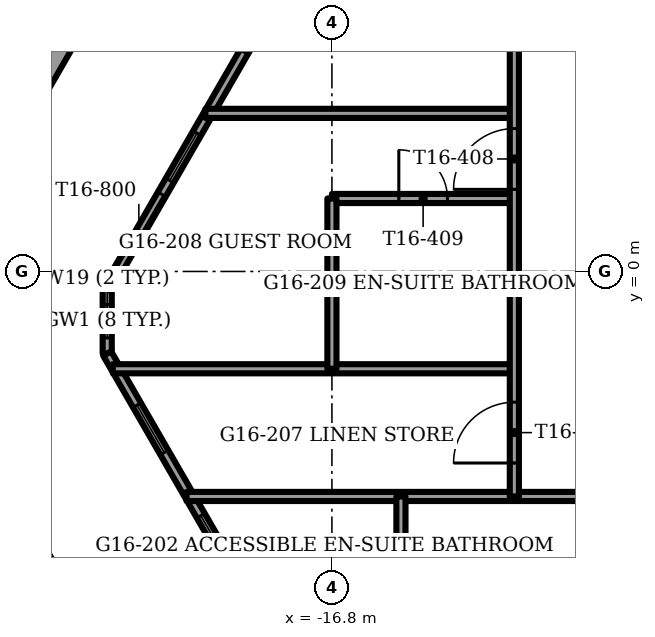
"""IFC4 building model, lengths in metres.
Left out: names, types, materials, properties, quantities, classifications, styles, units other than length and angle.
Written with IfcOpenShell. Run it as: python <this file> out.ifc"""

import sys

from ifc_helpers import new_model, si_unit, direction, frame, frame_2d, origin, place, context, subcontext, project, spatial, rectangle, extrude, element, fill, save


model = new_model("IFC4")
c1 = context("Model", 3, precision=1e-05, world=origin(), true_north=direction((0.0, 1.0)))
c2 = subcontext(c1, "Body", "Model", "MODEL_VIEW")
j1 = project(units=[si_unit("LENGTHUNIT", "METRE"), si_unit("PLANEANGLEUNIT", "RADIAN")], contexts=[c1])
p1 = place(None, origin())
s1 = spatial("IfcSite", under=j1, at=p1, CompositionType="ELEMENT")
p2 = place(p1, origin())
s2 = spatial("IfcBuilding", under=s1, at=p2, CompositionType="ELEMENT")
p3 = place(p2, frame((0.0, 0.0, 65.5)))
s3 = spatial("IfcBuildingStorey", under=s2, at=p3, CompositionType="ELEMENT", Elevation=65.5)
p4 = place(p3, frame((-20.214, 6.052, 0.0), z_axis=(0.0, 0.0, 1.0), x_axis=(-0.500014005679, -0.866017317451, 0.0)))
e1 = element("IfcWall", 1, at=p4, inside=s3, PredefinedType="PARAPET", context=c2, shape_type="SweptSolid", body=[
    extrude(rectangle(XDim=7.176, YDim=0.9, at=frame_2d((3.588, 0.0))), origin(), (0.0, 0.0, 1.0), 1.1),
])
p5 = place(p3, frame((-23.802, -1.474, 0.0), z_axis=(0.0, 0.0, 1.0), x_axis=(0.499996461177, -0.866027446915, 0.0)))
e2 = element("IfcWall", 2, at=p5, inside=s3, PredefinedType="PARAPET", context=c2, shape_type="SweptSolid", body=[
    extrude(rectangle(XDim=5.759, YDim=0.9, at=frame_2d((2.879, 0.0))), origin(), (0.0, 0.0, 1.0), 1.1),
])
p6 = place(p3, frame((-14.679, 9.789, 0.0), z_axis=(0.0, 0.0, 1.0), x_axis=(-0.500001004067, -0.866024824085, 0.0)))
e3 = element("IfcWall", 3, at=p6, inside=s3, PredefinedType="SOLIDWALL", context=c2, shape_type="SweptSolid", body=[
    extrude(rectangle(XDim=11.633, YDim=0.15, at=frame_2d((5.817, 0.0))), origin(), (0.0, 0.0, 1.0), 3.45),
])
p7 = place(p6, frame((3.538, 0.0, 0.15)))
e4 = element("IfcOpeningElement", 4, at=p7, cuts=e3, PredefinedType="OPENING", context=c2, shape_type="SweptSolid", body=[
    extrude(rectangle(XDim=1.8, YDim=2.2, at=frame_2d((0.9, 1.1))), frame((0.0, 0.075, 0.0), z_axis=(0.0, -1.0, 0.0), x_axis=(1.0, 0.0, 0.0)), (0.0, 0.0, 1.0), 0.15),
])
p8 = place(p6, frame((5.638, 0.0, 0.15)))
e5 = element("IfcOpeningElement", 5, at=p8, cuts=e3, PredefinedType="OPENING", context=c2, shape_type="SweptSolid", body=[
    extrude(rectangle(XDim=1.5, YDim=2.2, at=frame_2d((0.75, 1.1))), frame((0.0, 0.075, 0.0), z_axis=(0.0, -1.0, 0.0), x_axis=(1.0, 0.0, 0.0)), (0.0, 0.0, 1.0), 0.15),
])
p9 = place(p6, frame((8.677, 0.0, 0.15)))
e6 = element("IfcOpeningElement", 6, at=p9, cuts=e3, PredefinedType="OPENING", context=c2, shape_type="SweptSolid", body=[
    extrude(rectangle(XDim=0.9, YDim=2.2, at=frame_2d((0.45, 1.1))), frame((0.0, 0.075, 0.0), z_axis=(0.0, -1.0, 0.0), x_axis=(1.0, 0.0, 0.0)), (0.0, 0.0, 1.0), 0.15),
])
p10 = place(p6, frame((9.838, 0.0, 0.0)))
e7 = element("IfcOpeningElement", 7, at=p10, cuts=e3, PredefinedType="OPENING", context=c2, shape_type="SweptSolid", body=[
    extrude(rectangle(XDim=1.5, YDim=2.4, at=frame_2d((0.75, 1.2))), frame((0.0, 0.075, 0.0), z_axis=(0.0, -1.0, 0.0), x_axis=(1.0, 0.0, 0.0)), (0.0, 0.0, 1.0), 0.15),
])
p11 = place(p3, frame((-20.496, -1.351, 0.0), z_axis=(0.0, 0.0, 1.0), x_axis=(0.500010091595, -0.866019577321, 0.0)))
e8 = element("IfcWall", 8, at=p11, inside=s3, PredefinedType="SOLIDWALL", context=c2, shape_type="SweptSolid", body=[
    extrude(rectangle(XDim=11.633, YDim=0.15, at=frame_2d((5.816, 0.0))), origin(), (0.0, 0.0, 1.0), 3.45),
])
p12 = place(p11, frame((0.978, 0.0, 0.15)))
e9 = element("IfcOpeningElement", 9, at=p12, cuts=e8, PredefinedType="OPENING", context=c2, shape_type="SweptSolid", body=[
    extrude(rectangle(XDim=0.9, YDim=2.2, at=frame_2d((0.45, 1.1))), frame((0.0, 0.075, 0.0), z_axis=(0.0, -1.0, 0.0), x_axis=(1.0, 0.0, 0.0)), (0.0, 0.0, 1.0), 0.15),
])
p13 = place(p11, frame((3.078, 0.0, 0.15)))
e10 = element("IfcOpeningElement", 10, at=p13, cuts=e8, PredefinedType="OPENING", context=c2, shape_type="SweptSolid", body=[
    extrude(rectangle(XDim=1.5, YDim=2.2, at=frame_2d((0.75, 1.1))), frame((0.0, 0.075, 0.0), z_axis=(0.0, -1.0, 0.0), x_axis=(1.0, 0.0, 0.0)), (0.0, 0.0, 1.0), 0.15),
])
p14 = place(p11, frame((6.501, 0.0, 0.15)))
e11 = element("IfcOpeningElement", 11, at=p14, cuts=e8, PredefinedType="OPENING", context=c2, shape_type="SweptSolid", body=[
    extrude(rectangle(XDim=1.8, YDim=2.2, at=frame_2d((0.9, 1.1))), frame((0.0, 0.075, 0.0), z_axis=(0.0, -1.0, 0.0), x_axis=(1.0, 0.0, 0.0)), (0.0, 0.0, 1.0), 0.15),
])
p15 = place(p3, frame((-20.496, -0.286, 0.0), z_axis=(0.0, 0.0, 1.0), x_axis=(0.0, -1.0, 0.0)))
e12 = element("IfcWall", 12, at=p15, inside=s3, PredefinedType="SOLIDWALL", context=c2, shape_type="SweptSolid", body=[
    extrude(rectangle(XDim=1.065, YDim=0.15, at=frame_2d((0.532, 0.0))), origin(), (0.0, 0.0, 1.0), 3.45),
])
p16 = place(p15, frame((0.258, 0.0, 0.15)))
e13 = element("IfcOpeningElement", 13, at=p16, cuts=e12, PredefinedType="OPENING", context=c2, shape_type="SweptSolid", body=[
    extrude(rectangle(XDim=0.55, YDim=2.2, at=frame_2d((0.275, 1.1))), frame((0.0, 0.075, 0.0), z_axis=(0.0, -1.0, 0.0), x_axis=(1.0, 0.0, 0.0)), (0.0, 0.0, 1.0), 0.15),
])
p17 = place(p3, frame((-19.191, -3.7, 0.0), z_axis=(0.0, 0.0, 1.0), x_axis=(1.0, 0.0, 0.0)))
e14 = element("IfcWall", 14, at=p17, inside=s3, PredefinedType="PARTITIONING", context=c2, shape_type="SweptSolid", body=[
    extrude(rectangle(XDim=10.031, YDim=0.15, at=frame_2d((5.016, 0.0))), origin(), (0.0, 0.0, 1.0), 3.45),
])
p18 = place(p17, frame((8.791, 0.0, 0.0)))
e15 = element("IfcOpeningElement", 15, at=p18, cuts=e14, PredefinedType="OPENING", context=c2, shape_type="SweptSolid", body=[
    extrude(rectangle(XDim=1.0, YDim=2.1, at=frame_2d((0.5, 1.05))), frame((0.0, 0.075, 0.0), z_axis=(0.0, -1.0, 0.0), x_axis=(1.0, 0.0, 0.0)), (0.0, 0.0, 1.0), 0.15),
])
p19 = place(p3, frame((-20.404, -1.6, 0.0), z_axis=(0.0, 0.0, 1.0), x_axis=(1.0, 0.0, 0.0)))
e16 = element("IfcWall", 16, at=p19, inside=s3, PredefinedType="PARTITIONING", context=c2, shape_type="SweptSolid", body=[
    extrude(rectangle(XDim=6.604, YDim=0.15, at=frame_2d((3.302, 0.0))), origin(), (0.0, 0.0, 1.0), 3.45),
])
p20 = place(p3, frame((-16.8, 1.2, 0.0), z_axis=(0.0, 0.0, 1.0), x_axis=(1.0, 0.0, 0.0)))
e17 = element("IfcWall", 17, at=p20, inside=s3, PredefinedType="PARTITIONING", context=c2, shape_type="SweptSolid", body=[
    extrude(rectangle(XDim=3.0, YDim=0.15, at=frame_2d((1.5, 0.0))), origin(), (0.0, 0.0, 1.0), 3.45),
])
p21 = place(p20, frame((1.1, 0.0, 0.0)))
e18 = element("IfcOpeningElement", 18, at=p21, cuts=e17, PredefinedType="OPENING", context=c2, shape_type="SweptSolid", body=[
    extrude(rectangle(XDim=0.8, YDim=2.1, at=frame_2d((0.4, 1.05))), frame((0.0, 0.075, 0.0), z_axis=(0.0, -1.0, 0.0), x_axis=(1.0, 0.0, 0.0)), (0.0, 0.0, 1.0), 0.15),
])
p22 = place(p3, frame((-18.881, 2.6, 0.0), z_axis=(0.0, 0.0, 1.0), x_axis=(1.0, 0.0, 0.0)))
e19 = element("IfcWall", 19, at=p22, inside=s3, PredefinedType="PARTITIONING", context=c2, shape_type="SweptSolid", body=[
    extrude(rectangle(XDim=5.081, YDim=0.15, at=frame_2d((2.541, 0.0))), origin(), (0.0, 0.0, 1.0), 3.45),
])
p23 = place(p3, frame((-13.8, -3.7, 0.0), z_axis=(0.0, 0.0, 1.0), x_axis=(0.0, 1.0, 0.0)))
e20 = element("IfcWall", 20, at=p23, inside=s3, PredefinedType="PARTITIONING", context=c2, shape_type="SweptSolid", body=[
    extrude(rectangle(XDim=11.415, YDim=0.15, at=frame_2d((5.708, 0.0))), origin(), (0.0, 0.0, 1.0), 3.45),
])
p24 = place(p23, frame((0.55, 0.0, 0.0)))
e21 = element("IfcOpeningElement", 21, at=p24, cuts=e20, PredefinedType="OPENING", context=c2, shape_type="SweptSolid", body=[
    extrude(rectangle(XDim=1.0, YDim=2.1, at=frame_2d((0.5, 1.05))), frame((0.0, 0.075, 0.0), z_axis=(0.0, -1.0, 0.0), x_axis=(1.0, 0.0, 0.0)), (0.0, 0.0, 1.0), 0.15),
])
p25 = place(p23, frame((5.05, 0.0, 0.0)))
e22 = element("IfcOpeningElement", 22, at=p25, cuts=e20, PredefinedType="OPENING", context=c2, shape_type="SweptSolid", body=[
    extrude(rectangle(XDim=1.0, YDim=2.1, at=frame_2d((0.5, 1.05))), frame((0.0, 0.075, 0.0), z_axis=(0.0, -1.0, 0.0), x_axis=(1.0, 0.0, 0.0)), (0.0, 0.0, 1.0), 0.15),
])
p26 = place(p23, frame((8.358, 0.0, 0.0)))
e23 = element("IfcOpeningElement", 23, at=p26, cuts=e20, PredefinedType="OPENING", context=c2, shape_type="SweptSolid", body=[
    extrude(rectangle(XDim=1.0, YDim=2.1, at=frame_2d((0.5, 1.05))), frame((0.0, 0.075, 0.0), z_axis=(0.0, -1.0, 0.0), x_axis=(1.0, 0.0, 0.0)), (0.0, 0.0, 1.0), 0.15),
])
p27 = place(p3, frame((-15.665, -6.7, 0.0), z_axis=(0.0, 0.0, 1.0), x_axis=(0.0, 1.0, 0.0)))
e24 = element("IfcWall", 24, at=p27, inside=s3, PredefinedType="PARTITIONING", context=c2, shape_type="SweptSolid", body=[
    extrude(rectangle(XDim=3.0, YDim=0.15, at=frame_2d((1.5, 0.0))), origin(), (0.0, 0.0, 1.0), 3.45),
])
p28 = place(p27, frame((1.05, 0.0, 0.0)))
e25 = element("IfcOpeningElement", 25, at=p28, cuts=e24, PredefinedType="OPENING", context=c2, shape_type="SweptSolid", body=[
    extrude(rectangle(XDim=0.9, YDim=2.1, at=frame_2d((0.45, 1.05))), frame((0.0, 0.075, 0.0), z_axis=(0.0, -1.0, 0.0), x_axis=(1.0, 0.0, 0.0)), (0.0, 0.0, 1.0), 0.15),
])
p29 = place(p3, frame((-16.8, -1.6, 0.0), z_axis=(0.0, 0.0, 1.0), x_axis=(0.0, 1.0, 0.0)))
e26 = element("IfcWall", 26, at=p29, inside=s3, PredefinedType="PARTITIONING", context=c2, shape_type="SweptSolid", body=[
    extrude(rectangle(XDim=2.8, YDim=0.15, at=frame_2d((1.4, 0.0))), origin(), (0.0, 0.0, 1.0), 3.45),
])
p30 = place(p8, origin())
e27 = element("IfcWindow", 27, at=p30, inside=s3, PartitioningType="SINGLE_PANEL", PredefinedType="WINDOW", context=c2, shape_type="SweptSolid", body=[
    extrude(rectangle(XDim=1.5, YDim=2.2, at=frame_2d((0.75, 1.1))), frame((0.0, 0.03, 0.0), z_axis=(0.0, -1.0, 0.0), x_axis=(1.0, 0.0, 0.0)), (0.0, 0.0, 1.0), 0.06),
])
fill(e5, e27)
p31 = place(p9, origin())
e28 = element("IfcWindow", 28, at=p31, inside=s3, PartitioningType="SINGLE_PANEL", PredefinedType="WINDOW", context=c2, shape_type="SweptSolid", body=[
    extrude(rectangle(XDim=0.9, YDim=2.2, at=frame_2d((0.45, 1.1))), frame((0.0, 0.03, 0.0), z_axis=(0.0, -1.0, 0.0), x_axis=(1.0, 0.0, 0.0)), (0.0, 0.0, 1.0), 0.06),
])
fill(e6, e28)
p32 = place(p10, origin())
e29 = element("IfcDoor", 29, at=p32, inside=s3, OperationType="SLIDING_TO_LEFT", PredefinedType="DOOR", context=c2, shape_type="SweptSolid", body=[
    extrude(rectangle(XDim=1.5, YDim=2.4, at=frame_2d((0.75, 1.2))), frame((0.0, 0.025, 0.0), z_axis=(0.0, -1.0, 0.0), x_axis=(1.0, 0.0, 0.0)), (0.0, 0.0, 1.0), 0.05),
])
fill(e7, e29)
p33 = place(p12, origin())
e30 = element("IfcWindow", 30, at=p33, inside=s3, PartitioningType="SINGLE_PANEL", PredefinedType="WINDOW", context=c2, shape_type="SweptSolid", body=[
    extrude(rectangle(XDim=0.9, YDim=2.2, at=frame_2d((0.45, 1.1))), frame((0.0, 0.03, 0.0), z_axis=(0.0, -1.0, 0.0), x_axis=(1.0, 0.0, 0.0)), (0.0, 0.0, 1.0), 0.06),
])
fill(e9, e30)
p34 = place(p13, origin())
e31 = element("IfcWindow", 31, at=p34, inside=s3, PartitioningType="SINGLE_PANEL", PredefinedType="WINDOW", context=c2, shape_type="SweptSolid", body=[
    extrude(rectangle(XDim=1.5, YDim=2.2, at=frame_2d((0.75, 1.1))), frame((0.0, 0.03, 0.0), z_axis=(0.0, -1.0, 0.0), x_axis=(1.0, 0.0, 0.0)), (0.0, 0.0, 1.0), 0.06),
])
fill(e10, e31)
p35 = place(p16, origin())
e32 = element("IfcWindow", 32, at=p35, inside=s3, PartitioningType="SINGLE_PANEL", PredefinedType="WINDOW", context=c2, shape_type="SweptSolid", body=[
    extrude(rectangle(XDim=0.55, YDim=2.2, at=frame_2d((0.275, 1.1))), frame((0.0, 0.03, 0.0), z_axis=(0.0, -1.0, 0.0), x_axis=(1.0, 0.0, 0.0)), (0.0, 0.0, 1.0), 0.06),
])
fill(e13, e32)
p36 = place(p24, origin())
e33 = element("IfcDoor", 33, at=p36, inside=s3, OperationType="SINGLE_SWING_LEFT", PredefinedType="DOOR", context=c2, shape_type="SweptSolid", body=[
    extrude(rectangle(XDim=1.0, YDim=2.1, at=frame_2d((0.5, 1.05))), frame((0.0, 0.025, 0.0), z_axis=(0.0, -1.0, 0.0), x_axis=(1.0, 0.0, 0.0)), (0.0, 0.0, 1.0), 0.05),
])
fill(e21, e33)
p37 = place(p25, origin())
e34 = element("IfcDoor", 34, at=p37, inside=s3, OperationType="SINGLE_SWING_RIGHT", PredefinedType="DOOR", context=c2, shape_type="SweptSolid", body=[
    extrude(rectangle(XDim=1.0, YDim=2.1, at=frame_2d((0.5, 1.05))), frame((0.0, 0.025, 0.0), z_axis=(0.0, -1.0, 0.0), x_axis=(1.0, 0.0, 0.0)), (0.0, 0.0, 1.0), 0.05),
])
fill(e22, e34)
p38 = place(p21, origin())
e35 = element("IfcDoor", 35, at=p38, inside=s3, OperationType="SINGLE_SWING_RIGHT", PredefinedType="DOOR", context=c2, shape_type="SweptSolid", body=[
    extrude(rectangle(XDim=0.8, YDim=2.1, at=frame_2d((0.4, 1.05))), frame((0.0, 0.025, 0.0), z_axis=(0.0, -1.0, 0.0), x_axis=(1.0, 0.0, 0.0)), (0.0, 0.0, 1.0), 0.05),
])
fill(e18, e35)
save(model, sys.argv[1])
